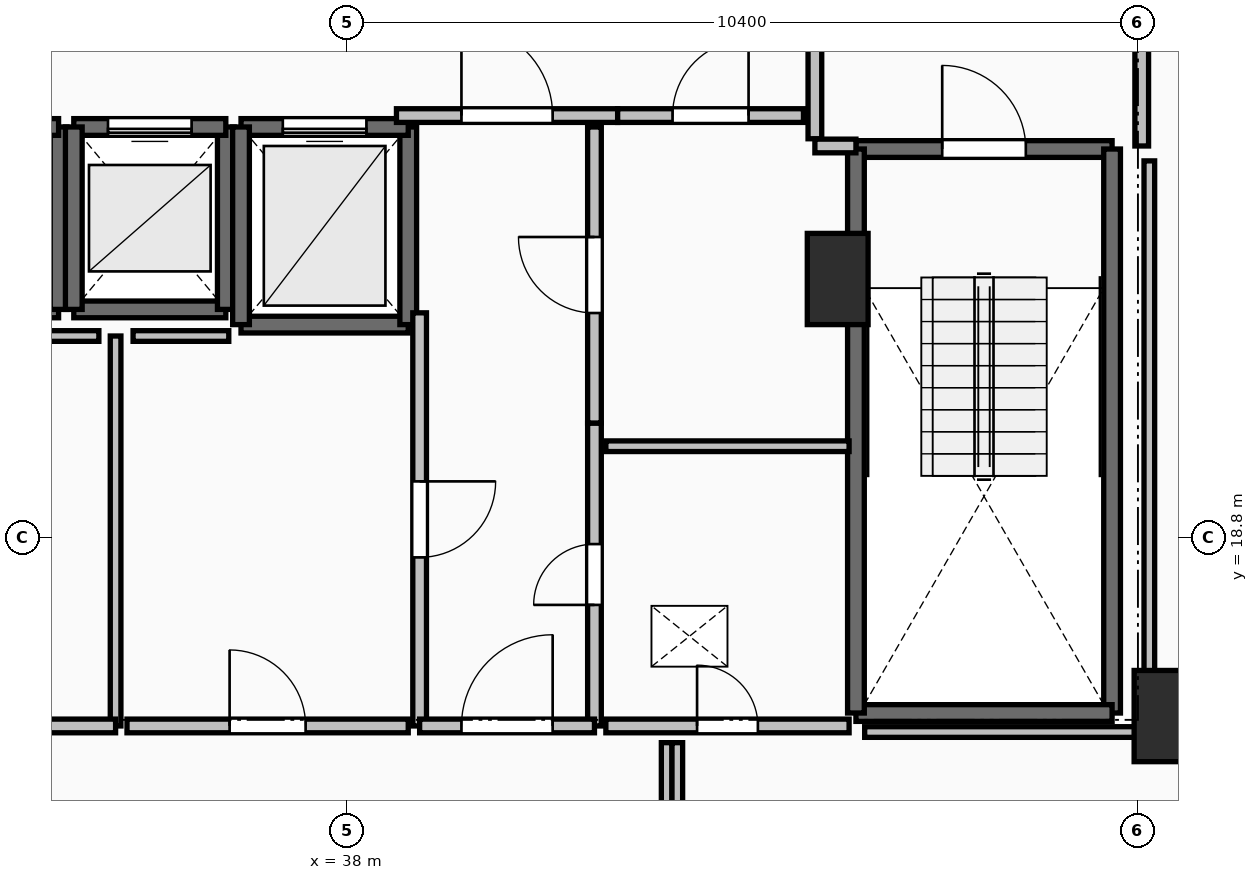
"""IFC4 building model, lengths in metres.
Left out: names, types, materials, properties, quantities, classifications, styles, units other than length and angle.
Written with IfcOpenShell. Run it as: python <this file> out.ifc"""

import sys

from ifc_helpers import new_model, si_unit, direction, frame, frame_2d, origin, origin_2d, place, context, subcontext, project, spatial, rectangle, extrude, element, fill, save


model = new_model("IFC4")
c1 = context("Model", 3, precision=1e-05, world=origin(), true_north=direction((0.0, 1.0)))
c2 = subcontext(c1, "Body", "Model", "MODEL_VIEW")
j1 = project(units=[si_unit("LENGTHUNIT", "METRE"), si_unit("PLANEANGLEUNIT", "RADIAN")], contexts=[c1])
p1 = place(None, origin())
s1 = spatial("IfcSite", under=j1, at=p1, CompositionType="ELEMENT")
p2 = place(p1, origin())
s2 = spatial("IfcBuilding", under=s1, at=p2, CompositionType="ELEMENT")
p3 = place(p2, frame((0.0, 0.0, 129.1)))
s3 = spatial("IfcBuildingStorey", under=s2, at=p3, CompositionType="ELEMENT", Elevation=129.1)
for number, where, z_axis, x_axis in (
    (1, (48.75, 16.45, 0.0), (0.0, 0.0, 1.0), (1.0, 0.0, 0.0)),
    (2, (44.45, 22.2, 0.0), (0.0, 0.0, 1.0), (1.0, 0.0, 0.0)),
):
    element("IfcColumn", number, at=place(p3, frame(where, z_axis=z_axis, x_axis=x_axis)), inside=s3, PredefinedType="PILASTER", context=c2, shape_type="SweptSolid", body=[
        extrude(rectangle(XDim=0.8, YDim=1.2, at=origin_2d()), origin(), (0.0, 0.0, 1.0), 3.5),
    ])
p4 = place(p3, frame((44.69, 23.91, 0.0), z_axis=(0.0, 0.0, 1.0), x_axis=(1.0, 0.0, 0.0)))
e3 = element("IfcWall", 3, at=p4, inside=s3, PredefinedType="SOLIDWALL", context=c2, shape_type="SweptSolid", body=[
    extrude(rectangle(XDim=3.37, YDim=0.22, at=frame_2d((1.685, 0.0))), origin(), (0.0, 0.0, 1.0), 3.24),
])
p5 = place(p4, frame((1.135, 0.0, 0.0)))
e4 = element("IfcOpeningElement", 4, at=p5, cuts=e3, PredefinedType="OPENING", context=c2, shape_type="SweptSolid", body=[
    extrude(rectangle(XDim=1.1, YDim=2.15, at=frame_2d((0.55, 1.075))), frame((0.0, 0.125, 0.0), z_axis=(0.0, -1.0, 0.0), x_axis=(1.0, 0.0, 0.0)), (0.0, 0.0, 1.0), 0.25),
])
p6 = place(p3, frame((48.06, 23.91, 0.0), z_axis=(0.0, 0.0, 1.0), x_axis=(0.0, -1.0, 0.0)))
e5 = element("IfcWall", 5, at=p6, inside=s3, PredefinedType="SOLIDWALL", context=c2, shape_type="SweptSolid", body=[
    extrude(rectangle(XDim=7.42, YDim=0.22, at=frame_2d((3.71, 0.0))), origin(), (0.0, 0.0, 1.0), 3.24),
])
p7 = place(p3, frame((48.06, 16.49, 0.0), z_axis=(0.0, 0.0, 1.0), x_axis=(-1.0, 0.0, 0.0)))
e6 = element("IfcWall", 6, at=p7, inside=s3, PredefinedType="SOLIDWALL", context=c2, shape_type="SweptSolid", body=[
    extrude(rectangle(XDim=3.37, YDim=0.22, at=frame_2d((1.685, 0.0))), origin(), (0.0, 0.0, 1.0), 3.24),
])
p8 = place(p3, frame((44.69, 16.49, 0.0), z_axis=(0.0, 0.0, 1.0), x_axis=(0.0, 1.0, 0.0)))
e7 = element("IfcWall", 7, at=p8, inside=s3, PredefinedType="SOLIDWALL", context=c2, shape_type="SweptSolid", body=[
    extrude(rectangle(XDim=7.42, YDim=0.22, at=frame_2d((3.71, 0.0))), origin(), (0.0, 0.0, 1.0), 3.24),
])
p9 = place(p3, frame((32.2, 21.8, 0.0), z_axis=(0.0, 0.0, 1.0), x_axis=(1.0, 0.0, 0.0)))
e8 = element("IfcWall", 8, at=p9, inside=s3, PredefinedType="SOLIDWALL", context=c2, shape_type="SweptSolid", body=[
    extrude(rectangle(XDim=2.0, YDim=0.22, at=frame_2d((1.0, 0.0))), origin(), (0.0, 0.0, 1.0), 3.24),
])
p10 = place(p3, frame((34.2, 21.8, 0.0), z_axis=(0.0, 0.0, 1.0), x_axis=(0.0, 1.0, 0.0)))
e9 = element("IfcWall", 9, at=p10, inside=s3, PredefinedType="SOLIDWALL", context=c2, shape_type="SweptSolid", body=[
    extrude(rectangle(XDim=2.4, YDim=0.22, at=frame_2d((1.2, 0.0))), origin(), (0.0, 0.0, 1.0), 3.24),
])
p11 = place(p3, frame((34.2, 24.2, 0.0), z_axis=(0.0, 0.0, 1.0), x_axis=(-1.0, 0.0, 0.0)))
e10 = element("IfcWall", 10, at=p11, inside=s3, PredefinedType="SOLIDWALL", context=c2, shape_type="SweptSolid", body=[
    extrude(rectangle(XDim=2.0, YDim=0.22, at=frame_2d((1.0, 0.0))), origin(), (0.0, 0.0, 1.0), 3.24),
])
p12 = place(p11, frame((0.45, 0.0, 0.0)))
e11 = element("IfcOpeningElement", 11, at=p12, cuts=e10, PredefinedType="OPENING", context=c2, shape_type="SweptSolid", body=[
    extrude(rectangle(XDim=1.1, YDim=2.2, at=frame_2d((0.55, 1.1))), frame((0.0, 0.125, 0.0), z_axis=(0.0, -1.0, 0.0), x_axis=(1.0, 0.0, 0.0)), (0.0, 0.0, 1.0), 0.25),
])
p13 = place(p3, frame((34.4, 21.8, 0.0), z_axis=(0.0, 0.0, 1.0), x_axis=(1.0, 0.0, 0.0)))
e12 = element("IfcWall", 12, at=p13, inside=s3, PredefinedType="SOLIDWALL", context=c2, shape_type="SweptSolid", body=[
    extrude(rectangle(XDim=2.0, YDim=0.22, at=frame_2d((1.0, 0.0))), origin(), (0.0, 0.0, 1.0), 3.24),
])
p14 = place(p3, frame((36.4, 21.8, 0.0), z_axis=(0.0, 0.0, 1.0), x_axis=(0.0, 1.0, 0.0)))
e13 = element("IfcWall", 13, at=p14, inside=s3, PredefinedType="SOLIDWALL", context=c2, shape_type="SweptSolid", body=[
    extrude(rectangle(XDim=2.4, YDim=0.22, at=frame_2d((1.2, 0.0))), origin(), (0.0, 0.0, 1.0), 3.24),
])
p15 = place(p3, frame((36.4, 24.2, 0.0), z_axis=(0.0, 0.0, 1.0), x_axis=(-1.0, 0.0, 0.0)))
e14 = element("IfcWall", 14, at=p15, inside=s3, PredefinedType="SOLIDWALL", context=c2, shape_type="SweptSolid", body=[
    extrude(rectangle(XDim=2.0, YDim=0.22, at=frame_2d((1.0, 0.0))), origin(), (0.0, 0.0, 1.0), 3.24),
])
p16 = place(p15, frame((0.45, 0.0, 0.0)))
e15 = element("IfcOpeningElement", 15, at=p16, cuts=e14, PredefinedType="OPENING", context=c2, shape_type="SweptSolid", body=[
    extrude(rectangle(XDim=1.1, YDim=2.2, at=frame_2d((0.55, 1.1))), frame((0.0, 0.125, 0.0), z_axis=(0.0, -1.0, 0.0), x_axis=(1.0, 0.0, 0.0)), (0.0, 0.0, 1.0), 0.25),
])
p17 = place(p3, frame((34.4, 24.2, 0.0), z_axis=(0.0, 0.0, 1.0), x_axis=(0.0, -1.0, 0.0)))
e16 = element("IfcWall", 16, at=p17, inside=s3, PredefinedType="SOLIDWALL", context=c2, shape_type="SweptSolid", body=[
    extrude(rectangle(XDim=2.4, YDim=0.22, at=frame_2d((1.2, 0.0))), origin(), (0.0, 0.0, 1.0), 3.24),
])
p18 = place(p3, frame((36.6, 21.6, 0.0), z_axis=(0.0, 0.0, 1.0), x_axis=(1.0, 0.0, 0.0)))
e17 = element("IfcWall", 17, at=p18, inside=s3, PredefinedType="SOLIDWALL", context=c2, shape_type="SweptSolid", body=[
    extrude(rectangle(XDim=2.2, YDim=0.22, at=frame_2d((1.1, 0.0))), origin(), (0.0, 0.0, 1.0), 3.24),
])
p19 = place(p3, frame((38.8, 21.6, 0.0), z_axis=(0.0, 0.0, 1.0), x_axis=(0.0, 1.0, 0.0)))
e18 = element("IfcWall", 18, at=p19, inside=s3, PredefinedType="SOLIDWALL", context=c2, shape_type="SweptSolid", body=[
    extrude(rectangle(XDim=2.6, YDim=0.22, at=frame_2d((1.3, 0.0))), origin(), (0.0, 0.0, 1.0), 3.24),
])
p20 = place(p3, frame((38.8, 24.2, 0.0), z_axis=(0.0, 0.0, 1.0), x_axis=(-1.0, 0.0, 0.0)))
e19 = element("IfcWall", 19, at=p20, inside=s3, PredefinedType="SOLIDWALL", context=c2, shape_type="SweptSolid", body=[
    extrude(rectangle(XDim=2.2, YDim=0.22, at=frame_2d((1.1, 0.0))), origin(), (0.0, 0.0, 1.0), 3.24),
])
p21 = place(p20, frame((0.55, 0.0, 0.0)))
e20 = element("IfcOpeningElement", 20, at=p21, cuts=e19, PredefinedType="OPENING", context=c2, shape_type="SweptSolid", body=[
    extrude(rectangle(XDim=1.1, YDim=2.2, at=frame_2d((0.55, 1.1))), frame((0.0, 0.125, 0.0), z_axis=(0.0, -1.0, 0.0), x_axis=(1.0, 0.0, 0.0)), (0.0, 0.0, 1.0), 0.25),
])
p22 = place(p3, frame((36.6, 24.2, 0.0), z_axis=(0.0, 0.0, 1.0), x_axis=(0.0, -1.0, 0.0)))
e21 = element("IfcWall", 21, at=p22, inside=s3, PredefinedType="SOLIDWALL", context=c2, shape_type="SweptSolid", body=[
    extrude(rectangle(XDim=2.6, YDim=0.22, at=frame_2d((1.3, 0.0))), origin(), (0.0, 0.0, 1.0), 3.24),
])
p23 = place(p3, frame((44.15, 27.955, 0.0), z_axis=(0.0, 0.0, 1.0), x_axis=(0.0, -1.0, 0.0)))
e22 = element("IfcWall", 22, at=p23, inside=s3, PredefinedType="PARTITIONING", context=c2, shape_type="SweptSolid", body=[
    extrude(rectangle(XDim=3.91, YDim=0.18, at=frame_2d((1.955, 0.0))), origin(), (0.0, 0.0, 1.0), 3.24),
])
p24 = place(p23, frame((1.355, 0.0, 0.0)))
e23 = element("IfcOpeningElement", 23, at=p24, cuts=e22, PredefinedType="OPENING", context=c2, shape_type="SweptSolid", body=[
    extrude(rectangle(XDim=1.2, YDim=2.15, at=frame_2d((0.6, 1.075))), frame((0.0, 0.105, 0.0), z_axis=(0.0, -1.0, 0.0), x_axis=(1.0, 0.0, 0.0)), (0.0, 0.0, 1.0), 0.21),
])
p25 = place(p3, frame((44.15, 23.95, 0.0), z_axis=(0.0, 0.0, 1.0), x_axis=(1.0, 0.0, 0.0)))
e24 = element("IfcWall", 24, at=p25, inside=s3, PredefinedType="PARTITIONING", context=c2, shape_type="SweptSolid", body=[
    extrude(rectangle(XDim=0.54, YDim=0.18, at=frame_2d((0.27, 0.0))), origin(), (0.0, 0.0, 1.0), 3.24),
])
p26 = place(p3, frame((48.45, 23.95, 0.0), z_axis=(0.0, 0.0, 1.0), x_axis=(0.0, 1.0, 0.0)))
e25 = element("IfcWall", 25, at=p26, inside=s3, PredefinedType="PARTITIONING", context=c2, shape_type="SweptSolid", body=[
    extrude(rectangle(XDim=4.05, YDim=0.18, at=frame_2d((2.025, 0.0))), origin(), (0.0, 0.0, 1.0), 3.24),
])
p27 = place(p26, frame((1.425, 0.0, 0.0)))
e26 = element("IfcOpeningElement", 26, at=p27, cuts=e25, PredefinedType="OPENING", context=c2, shape_type="SweptSolid", body=[
    extrude(rectangle(XDim=1.2, YDim=2.15, at=frame_2d((0.6, 1.075))), frame((0.0, 0.105, 0.0), z_axis=(0.0, -1.0, 0.0), x_axis=(1.0, 0.0, 0.0)), (0.0, 0.0, 1.0), 0.21),
])
p28 = place(p3, frame((38.645, 24.35, 0.0), z_axis=(0.0, 0.0, 1.0), x_axis=(1.0, 0.0, 0.0)))
e27 = element("IfcWall", 27, at=p28, inside=s3, PredefinedType="PARTITIONING", context=c2, shape_type="SweptSolid", body=[
    extrude(rectangle(XDim=2.91, YDim=0.18, at=frame_2d((1.455, 0.0))), origin(), (0.0, 0.0, 1.0), 3.24),
])
p29 = place(p28, frame((0.855, 0.0, 0.0)))
e28 = element("IfcOpeningElement", 28, at=p29, cuts=e27, PredefinedType="OPENING", context=c2, shape_type="SweptSolid", body=[
    extrude(rectangle(XDim=1.2, YDim=2.15, at=frame_2d((0.6, 1.075))), frame((0.0, 0.105, 0.0), z_axis=(0.0, -1.0, 0.0), x_axis=(1.0, 0.0, 0.0)), (0.0, 0.0, 1.0), 0.21),
])
p30 = place(p3, frame((41.555, 24.35, 0.0), z_axis=(0.0, 0.0, 1.0), x_axis=(1.0, 0.0, 0.0)))
e29 = element("IfcWall", 29, at=p30, inside=s3, PredefinedType="PARTITIONING", context=c2, shape_type="SweptSolid", body=[
    extrude(rectangle(XDim=2.445, YDim=0.18, at=frame_2d((1.223, 0.0))), origin(), (0.0, 0.0, 1.0), 3.24),
])
p31 = place(p30, frame((0.722, 0.0, 0.0)))
e30 = element("IfcOpeningElement", 30, at=p31, cuts=e29, PredefinedType="OPENING", context=c2, shape_type="SweptSolid", body=[
    extrude(rectangle(XDim=1.0, YDim=2.15, at=frame_2d((0.5, 1.075))), frame((0.0, 0.105, 0.0), z_axis=(0.0, -1.0, 0.0), x_axis=(1.0, 0.0, 0.0)), (0.0, 0.0, 1.0), 0.21),
])
p32 = place(p3, frame((41.25, 16.32, 0.0), z_axis=(0.0, 0.0, 1.0), x_axis=(0.0, 1.0, 0.0)))
e31 = element("IfcWall", 31, at=p32, inside=s3, PredefinedType="PARTITIONING", context=c2, shape_type="SweptSolid", body=[
    extrude(rectangle(XDim=3.985, YDim=0.18, at=frame_2d((1.992, 0.0))), origin(), (0.0, 0.0, 1.0), 3.24),
])
p33 = place(p32, frame((1.593, 0.0, 0.0)))
e32 = element("IfcOpeningElement", 32, at=p33, cuts=e31, PredefinedType="OPENING", context=c2, shape_type="SweptSolid", body=[
    extrude(rectangle(XDim=0.8, YDim=2.05, at=frame_2d((0.4, 1.025))), frame((0.0, 0.105, 0.0), z_axis=(0.0, -1.0, 0.0), x_axis=(1.0, 0.0, 0.0)), (0.0, 0.0, 1.0), 0.21),
])
p34 = place(p3, frame((41.25, 20.305, 0.0), z_axis=(0.0, 0.0, 1.0), x_axis=(0.0, 1.0, 0.0)))
e33 = element("IfcWall", 33, at=p34, inside=s3, PredefinedType="PARTITIONING", context=c2, shape_type="SweptSolid", body=[
    extrude(rectangle(XDim=3.895, YDim=0.18, at=frame_2d((1.948, 0.0))), origin(), (0.0, 0.0, 1.0), 3.24),
])
p35 = place(p34, frame((1.448, 0.0, 0.0)))
e34 = element("IfcOpeningElement", 34, at=p35, cuts=e33, PredefinedType="OPENING", context=c2, shape_type="SweptSolid", body=[
    extrude(rectangle(XDim=1.0, YDim=2.15, at=frame_2d((0.5, 1.075))), frame((0.0, 0.105, 0.0), z_axis=(0.0, -1.0, 0.0), x_axis=(1.0, 0.0, 0.0)), (0.0, 0.0, 1.0), 0.21),
])
p36 = place(p3, frame((38.95, 21.755, 0.0), z_axis=(0.0, 0.0, 1.0), x_axis=(0.0, -1.0, 0.0)))
e35 = element("IfcWall", 35, at=p36, inside=s3, PredefinedType="PARTITIONING", context=c2, shape_type="SweptSolid", body=[
    extrude(rectangle(XDim=5.435, YDim=0.18, at=frame_2d((2.717, 0.0))), origin(), (0.0, 0.0, 1.0), 3.24),
])
p37 = place(p36, frame((2.218, 0.0, 0.0)))
e36 = element("IfcOpeningElement", 36, at=p37, cuts=e35, PredefinedType="OPENING", context=c2, shape_type="SweptSolid", body=[
    extrude(rectangle(XDim=1.0, YDim=2.15, at=frame_2d((0.5, 1.075))), frame((0.0, 0.105, 0.0), z_axis=(0.0, -1.0, 0.0), x_axis=(1.0, 0.0, 0.0)), (0.0, 0.0, 1.0), 0.21),
])
p38 = place(p3, frame((38.95, 16.32, 0.0), z_axis=(0.0, 0.0, 1.0), x_axis=(1.0, 0.0, 0.0)))
e37 = element("IfcWall", 37, at=p38, inside=s3, PredefinedType="PARTITIONING", context=c2, shape_type="SweptSolid", body=[
    extrude(rectangle(XDim=2.3, YDim=0.18, at=frame_2d((1.15, 0.0))), origin(), (0.0, 0.0, 1.0), 3.24),
])
p39 = place(p38, frame((0.55, 0.0, 0.0)))
e38 = element("IfcOpeningElement", 38, at=p39, cuts=e37, PredefinedType="OPENING", context=c2, shape_type="SweptSolid", body=[
    extrude(rectangle(XDim=1.2, YDim=2.15, at=frame_2d((0.6, 1.075))), frame((0.0, 0.105, 0.0), z_axis=(0.0, -1.0, 0.0), x_axis=(1.0, 0.0, 0.0)), (0.0, 0.0, 1.0), 0.21),
])
p40 = place(p3, frame((44.6, 20.0, 0.0), z_axis=(0.0, 0.0, 1.0), x_axis=(-1.0, 0.0, 0.0)))
e39 = element("IfcWall", 39, at=p40, inside=s3, PredefinedType="PARTITIONING", context=c2, shape_type="SweptSolid", body=[
    extrude(rectangle(XDim=3.2, YDim=0.14, at=frame_2d((1.6, 0.0))), origin(), (0.0, 0.0, 1.0), 3.24),
])
p41 = place(p3, frame((41.4, 16.32, 0.0), z_axis=(0.0, 0.0, 1.0), x_axis=(1.0, 0.0, 0.0)))
e40 = element("IfcWall", 40, at=p41, inside=s3, PredefinedType="PARTITIONING", context=c2, shape_type="SweptSolid", body=[
    extrude(rectangle(XDim=3.2, YDim=0.18, at=frame_2d((1.6, 0.0))), origin(), (0.0, 0.0, 1.0), 3.24),
])
p42 = place(p41, frame((1.2, 0.0, 0.0)))
e41 = element("IfcOpeningElement", 41, at=p42, cuts=e40, PredefinedType="OPENING", context=c2, shape_type="SweptSolid", body=[
    extrude(rectangle(XDim=0.8, YDim=2.05, at=frame_2d((0.4, 1.025))), frame((0.0, 0.105, 0.0), z_axis=(0.0, -1.0, 0.0), x_axis=(1.0, 0.0, 0.0)), (0.0, 0.0, 1.0), 0.21),
])
p43 = place(p3, frame((34.95, 16.32, 0.0), z_axis=(0.0, 0.0, 1.0), x_axis=(0.0, 1.0, 0.0)))
e42 = element("IfcWall", 42, at=p43, inside=s3, PredefinedType="PARTITIONING", context=c2, shape_type="SweptSolid", body=[
    extrude(rectangle(XDim=5.13, YDim=0.14, at=frame_2d((2.565, 0.0))), origin(), (0.0, 0.0, 1.0), 3.24),
])
p44 = place(p3, frame((31.4, 16.32, 0.0), z_axis=(0.0, 0.0, 1.0), x_axis=(1.0, 0.0, 0.0)))
e43 = element("IfcWall", 43, at=p44, inside=s3, PredefinedType="PARTITIONING", context=c2, shape_type="SweptSolid", body=[
    extrude(rectangle(XDim=3.55, YDim=0.18, at=frame_2d((1.775, 0.0))), origin(), (0.0, 0.0, 1.0), 3.24),
])
p45 = place(p44, frame((1.35, 0.0, 0.0)))
e44 = element("IfcOpeningElement", 44, at=p45, cuts=e43, PredefinedType="OPENING", context=c2, shape_type="SweptSolid", body=[
    extrude(rectangle(XDim=0.85, YDim=2.1, at=frame_2d((0.425, 1.05))), frame((0.0, 0.105, 0.0), z_axis=(0.0, -1.0, 0.0), x_axis=(1.0, 0.0, 0.0)), (0.0, 0.0, 1.0), 0.21),
])
p46 = place(p3, frame((35.1, 16.32, 0.0), z_axis=(0.0, 0.0, 1.0), x_axis=(1.0, 0.0, 0.0)))
e45 = element("IfcWall", 45, at=p46, inside=s3, PredefinedType="PARTITIONING", context=c2, shape_type="SweptSolid", body=[
    extrude(rectangle(XDim=3.7, YDim=0.18, at=frame_2d((1.85, 0.0))), origin(), (0.0, 0.0, 1.0), 3.24),
])
p47 = place(p46, frame((1.35, 0.0, 0.0)))
e46 = element("IfcOpeningElement", 46, at=p47, cuts=e45, PredefinedType="OPENING", context=c2, shape_type="SweptSolid", body=[
    extrude(rectangle(XDim=1.0, YDim=2.15, at=frame_2d((0.5, 1.075))), frame((0.0, 0.105, 0.0), z_axis=(0.0, -1.0, 0.0), x_axis=(1.0, 0.0, 0.0)), (0.0, 0.0, 1.0), 0.21),
])
p48 = place(p3, frame((34.73, 21.45, 0.0), z_axis=(0.0, 0.0, 1.0), x_axis=(-1.0, 0.0, 0.0)))
e47 = element("IfcWall", 47, at=p48, inside=s3, PredefinedType="PARTITIONING", context=c2, shape_type="SweptSolid", body=[
    extrude(rectangle(XDim=3.2, YDim=0.14, at=frame_2d((1.6, 0.0))), origin(), (0.0, 0.0, 1.0), 3.24),
])
p49 = place(p3, frame((36.439, 21.45, 0.0), z_axis=(0.0, 0.0, 1.0), x_axis=(-1.0, 0.0, 0.0)))
e48 = element("IfcWall", 48, at=p49, inside=s3, PredefinedType="PARTITIONING", context=c2, shape_type="SweptSolid", body=[
    extrude(rectangle(XDim=1.259, YDim=0.14, at=frame_2d((0.629, 0.0))), origin(), (0.0, 0.0, 1.0), 3.24),
])
for number, where, z_axis, x_axis in (
    (49, (42.2, 16.1, 0.0), (0.0, 0.0, 1.0), (0.0, -1.0, 0.0)),
    (50, (42.34, 14.27, 0.0), (0.0, 0.0, 1.0), (0.0, 1.0, 0.0)),
):
    element("IfcWall", number, at=place(p3, frame(where, z_axis=z_axis, x_axis=x_axis)), inside=s3, PredefinedType="PARTITIONING", context=c2, shape_type="SweptSolid", body=[
        extrude(rectangle(XDim=1.83, YDim=0.14, at=frame_2d((0.915, 0.0))), origin(), (0.0, 0.0, 1.0), 3.24),
    ])
p50 = place(p3, frame((44.805, 16.24, 0.0), z_axis=(0.0, 0.0, 1.0), x_axis=(1.0, 0.0, 0.0)))
e51 = element("IfcWall", 51, at=p50, inside=s3, PredefinedType="PARTITIONING", context=c2, shape_type="SweptSolid", body=[
    extrude(rectangle(XDim=3.745, YDim=0.14, at=frame_2d((1.873, 0.0))), origin(), (0.0, 0.0, 1.0), 2.432),
])
p51 = place(p3, frame((48.55, 16.24, 0.0), z_axis=(0.0, 0.0, 1.0), x_axis=(0.0, 1.0, 0.0)))
e52 = element("IfcWall", 52, at=p51, inside=s3, PredefinedType="PARTITIONING", context=c2, shape_type="SweptSolid", body=[
    extrude(rectangle(XDim=7.514, YDim=0.14, at=frame_2d((3.757, 0.0))), origin(), (0.0, 0.0, 1.0), 2.432),
])
p52 = place(p5, origin())
e53 = element("IfcDoor", 53, at=p52, inside=s3, OperationType="SINGLE_SWING_LEFT", PredefinedType="DOOR", context=c2, shape_type="SweptSolid", body=[
    extrude(rectangle(XDim=1.1, YDim=2.15, at=frame_2d((0.55, 1.075))), frame((0.0, 0.025, 0.0), z_axis=(0.0, -1.0, 0.0), x_axis=(1.0, 0.0, 0.0)), (0.0, 0.0, 1.0), 0.05),
])
fill(e4, e53)
p53 = place(p16, origin())
e54 = element("IfcDoor", 54, at=p53, inside=s3, OperationType="SLIDING_TO_LEFT", PredefinedType="DOOR", context=c2, shape_type="SweptSolid", body=[
    extrude(rectangle(XDim=1.1, YDim=2.2, at=frame_2d((0.55, 1.1))), frame((0.0, 0.025, 0.0), z_axis=(0.0, -1.0, 0.0), x_axis=(1.0, 0.0, 0.0)), (0.0, 0.0, 1.0), 0.05),
])
fill(e15, e54)
p54 = place(p21, origin())
e55 = element("IfcDoor", 55, at=p54, inside=s3, OperationType="SLIDING_TO_LEFT", PredefinedType="DOOR", context=c2, shape_type="SweptSolid", body=[
    extrude(rectangle(XDim=1.1, YDim=2.2, at=frame_2d((0.55, 1.1))), frame((0.0, 0.025, 0.0), z_axis=(0.0, -1.0, 0.0), x_axis=(1.0, 0.0, 0.0)), (0.0, 0.0, 1.0), 0.05),
])
fill(e20, e55)
p55 = place(p29, origin())
e56 = element("IfcDoor", 56, at=p55, inside=s3, OperationType="SINGLE_SWING_LEFT", PredefinedType="DOOR", context=c2, shape_type="SweptSolid", body=[
    extrude(rectangle(XDim=1.2, YDim=2.15, at=frame_2d((0.6, 1.075))), frame((0.0, 0.025, 0.0), z_axis=(0.0, -1.0, 0.0), x_axis=(1.0, 0.0, 0.0)), (0.0, 0.0, 1.0), 0.05),
])
fill(e28, e56)
p56 = place(p31, origin())
e57 = element("IfcDoor", 57, at=p56, inside=s3, OperationType="SINGLE_SWING_RIGHT", PredefinedType="DOOR", context=c2, shape_type="SweptSolid", body=[
    extrude(rectangle(XDim=1.0, YDim=2.15, at=frame_2d((0.5, 1.075))), frame((0.0, 0.025, 0.0), z_axis=(0.0, -1.0, 0.0), x_axis=(1.0, 0.0, 0.0)), (0.0, 0.0, 1.0), 0.05),
])
fill(e30, e57)
p57 = place(p33, origin())
e58 = element("IfcDoor", 58, at=p57, inside=s3, OperationType="SINGLE_SWING_LEFT", PredefinedType="DOOR", context=c2, shape_type="SweptSolid", body=[
    extrude(rectangle(XDim=0.8, YDim=2.05, at=frame_2d((0.4, 1.025))), frame((0.0, 0.025, 0.0), z_axis=(0.0, -1.0, 0.0), x_axis=(1.0, 0.0, 0.0)), (0.0, 0.0, 1.0), 0.05),
])
fill(e32, e58)
p58 = place(p35, origin())
e59 = element("IfcDoor", 59, at=p58, inside=s3, OperationType="SINGLE_SWING_RIGHT", PredefinedType="DOOR", context=c2, shape_type="SweptSolid", body=[
    extrude(rectangle(XDim=1.0, YDim=2.15, at=frame_2d((0.5, 1.075))), frame((0.0, 0.025, 0.0), z_axis=(0.0, -1.0, 0.0), x_axis=(1.0, 0.0, 0.0)), (0.0, 0.0, 1.0), 0.05),
])
fill(e34, e59)
p59 = place(p37, origin())
e60 = element("IfcDoor", 60, at=p59, inside=s3, OperationType="SINGLE_SWING_LEFT", PredefinedType="DOOR", context=c2, shape_type="SweptSolid", body=[
    extrude(rectangle(XDim=1.0, YDim=2.15, at=frame_2d((0.5, 1.075))), frame((0.0, 0.025, 0.0), z_axis=(0.0, -1.0, 0.0), x_axis=(1.0, 0.0, 0.0)), (0.0, 0.0, 1.0), 0.05),
])
fill(e36, e60)
p60 = place(p39, origin())
e61 = element("IfcDoor", 61, at=p60, inside=s3, OperationType="SINGLE_SWING_RIGHT", PredefinedType="DOOR", context=c2, shape_type="SweptSolid", body=[
    extrude(rectangle(XDim=1.2, YDim=2.15, at=frame_2d((0.6, 1.075))), frame((0.0, 0.025, 0.0), z_axis=(0.0, -1.0, 0.0), x_axis=(1.0, 0.0, 0.0)), (0.0, 0.0, 1.0), 0.05),
])
fill(e38, e61)
p61 = place(p42, origin())
e62 = element("IfcDoor", 62, at=p61, inside=s3, OperationType="SINGLE_SWING_LEFT", PredefinedType="DOOR", context=c2, shape_type="SweptSolid", body=[
    extrude(rectangle(XDim=0.8, YDim=2.05, at=frame_2d((0.4, 1.025))), frame((0.0, 0.025, 0.0), z_axis=(0.0, -1.0, 0.0), x_axis=(1.0, 0.0, 0.0)), (0.0, 0.0, 1.0), 0.05),
])
fill(e41, e62)
p62 = place(p47, origin())
e63 = element("IfcDoor", 63, at=p62, inside=s3, OperationType="SINGLE_SWING_LEFT", PredefinedType="DOOR", context=c2, shape_type="SweptSolid", body=[
    extrude(rectangle(XDim=1.0, YDim=2.15, at=frame_2d((0.5, 1.075))), frame((0.0, 0.025, 0.0), z_axis=(0.0, -1.0, 0.0), x_axis=(1.0, 0.0, 0.0)), (0.0, 0.0, 1.0), 0.05),
])
fill(e46, e63)
save(model, sys.argv[1])
